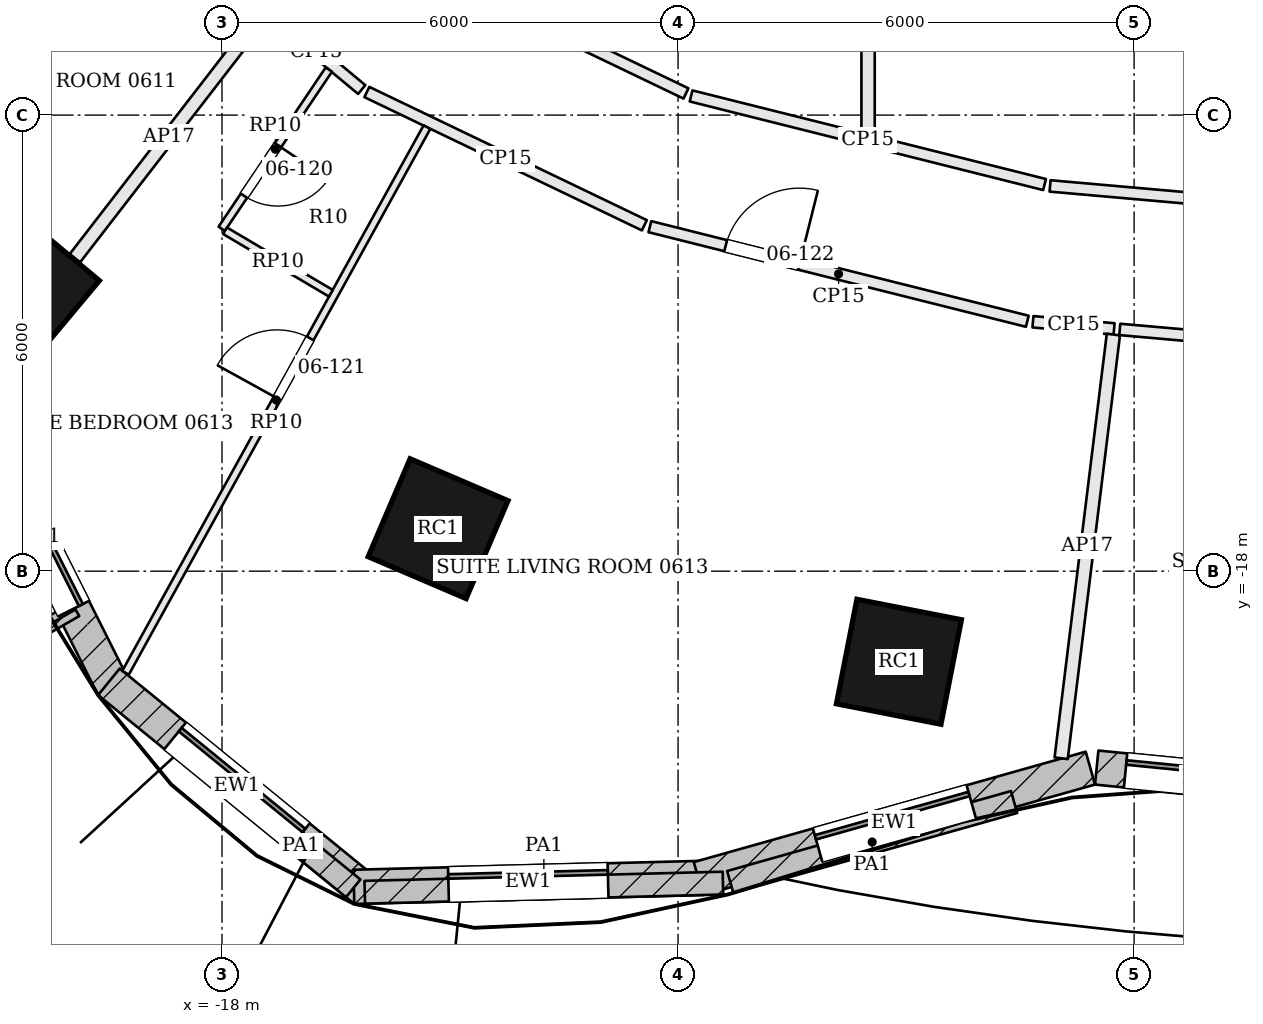
"""IFC4 building model, lengths in metres.
Left out: names, types, materials, properties, quantities, classifications, styles, units other than length and angle.
Written with IfcOpenShell. Run it as: python <this file> out.ifc"""

import sys

from ifc_helpers import new_model, si_unit, direction, frame, frame_2d, origin, origin_2d, place, context, subcontext, project, spatial, rectangle, extrude, element, fill, save


model = new_model("IFC4")
c1 = context("Model", 3, precision=1e-05, world=origin(), true_north=direction((0.0, 1.0)))
c2 = subcontext(c1, "Body", "Model", "MODEL_VIEW")
j1 = project(units=[si_unit("LENGTHUNIT", "METRE"), si_unit("PLANEANGLEUNIT", "RADIAN")], contexts=[c1])
p1 = place(None, origin())
s1 = spatial("IfcSite", under=j1, at=p1, CompositionType="ELEMENT")
p2 = place(p1, origin())
s2 = spatial("IfcBuilding", under=s1, at=p2, CompositionType="ELEMENT")
p3 = place(p2, frame((0.0, 0.0, 37.5)))
s3 = spatial("IfcBuildingStorey", under=s2, at=p3, CompositionType="ELEMENT", Elevation=37.5)
for number, where, z_axis, x_axis in (
    (1, (-20.6, -14.266, 0.0), (0.0, 0.0, 1.0), (0.767, -0.641, 0.0)),
    (2, (-15.157, -17.441, 0.0), (0.0, 0.0, 1.0), (0.919, -0.394, 0.0)),
    (3, (-9.094, -19.192, 0.0), (0.0, 0.0, 1.0), (0.981, -0.192, 0.0)),
):
    element("IfcColumn", number, at=place(p3, frame(where, z_axis=z_axis, x_axis=x_axis)), inside=s3, PredefinedType="COLUMN", context=c2, shape_type="SweptSolid", body=[
        extrude(rectangle(XDim=1.4, YDim=1.4, at=origin_2d()), origin(), (0.0, 0.0, 1.0), 3.6),
    ])
p4 = place(p3, frame((-21.413, -15.586, 0.0), z_axis=(0.0, 0.0, 1.0), x_axis=(0.449428064685, -0.893316525467, 0.0)))
e4 = element("IfcWall", 4, at=p4, inside=s3, PredefinedType="SOLIDWALL", context=c2, shape_type="SweptSolid", body=[
    extrude(rectangle(XDim=4.407, YDim=0.45, at=frame_2d((2.204, 0.0))), origin(), (0.0, 0.0, 1.0), 3.4),
])
p5 = place(p4, frame((1.154, 0.0, 0.9)))
e5 = element("IfcOpeningElement", 5, at=p5, cuts=e4, PredefinedType="OPENING", context=c2, shape_type="SweptSolid", body=[
    extrude(rectangle(XDim=2.1, YDim=2.0, at=frame_2d((1.05, 1.0))), frame((0.0, 0.235, 0.0), z_axis=(0.0, -1.0, 0.0), x_axis=(1.0, 0.0, 0.0)), (0.0, 0.0, 1.0), 0.47),
])
p6 = place(p3, frame((-19.488, -19.456, 0.0), z_axis=(0.0, 0.0, 1.0), x_axis=(0.775096506427, -0.631842864741, 0.0)))
e6 = element("IfcWall", 6, at=p6, inside=s3, PredefinedType="SOLIDWALL", context=c2, shape_type="SweptSolid", body=[
    extrude(rectangle(XDim=4.349, YDim=0.45, at=frame_2d((2.175, 0.0))), origin(), (0.0, 0.0, 1.0), 3.4),
])
p7 = place(p6, frame((1.125, 0.0, 0.9)))
e7 = element("IfcOpeningElement", 7, at=p7, cuts=e6, PredefinedType="OPENING", context=c2, shape_type="SweptSolid", body=[
    extrude(rectangle(XDim=2.1, YDim=2.0, at=frame_2d((1.05, 1.0))), frame((0.0, 0.235, 0.0), z_axis=(0.0, -1.0, 0.0), x_axis=(1.0, 0.0, 0.0)), (0.0, 0.0, 1.0), 0.47),
])
p8 = place(p3, frame((-16.265, -22.153, 0.0), z_axis=(0.0, 0.0, 1.0), x_axis=(0.999672618135, 0.025586257081, 0.0)))
e8 = element("IfcWall", 8, at=p8, inside=s3, PredefinedType="SOLIDWALL", context=c2, shape_type="SweptSolid", body=[
    extrude(rectangle(XDim=4.59, YDim=0.45, at=frame_2d((2.295, 0.0))), origin(), (0.0, 0.0, 1.0), 3.4),
])
p9 = place(p8, frame((1.245, 0.0, 0.9)))
e9 = element("IfcOpeningElement", 9, at=p9, cuts=e8, PredefinedType="OPENING", context=c2, shape_type="SweptSolid", body=[
    extrude(rectangle(XDim=2.1, YDim=2.0, at=frame_2d((1.05, 1.0))), frame((0.0, 0.235, 0.0), z_axis=(0.0, -1.0, 0.0), x_axis=(1.0, 0.0, 0.0)), (0.0, 0.0, 1.0), 0.47),
])
p10 = place(p3, frame((-11.732, -22.044, 0.0), z_axis=(0.0, 0.0, 1.0), x_axis=(0.962535416232, 0.271155992925, 0.0)))
e10 = element("IfcWall", 10, at=p10, inside=s3, PredefinedType="SOLIDWALL", context=c2, shape_type="SweptSolid", body=[
    extrude(rectangle(XDim=5.357, YDim=0.45, at=frame_2d((2.679, 0.0))), origin(), (0.0, 0.0, 1.0), 3.4),
])
p11 = place(p10, frame((1.629, 0.0, 0.9)))
e11 = element("IfcOpeningElement", 11, at=p11, cuts=e10, PredefinedType="OPENING", context=c2, shape_type="SweptSolid", body=[
    extrude(rectangle(XDim=2.1, YDim=2.0, at=frame_2d((1.05, 1.0))), frame((0.0, 0.235, 0.0), z_axis=(0.0, -1.0, 0.0), x_axis=(1.0, 0.0, 0.0)), (0.0, 0.0, 1.0), 0.47),
])
p12 = place(p3, frame((-6.492, -20.584, 0.0), z_axis=(0.0, 0.0, 1.0), x_axis=(0.995123748575, -0.098634299418, 0.0)))
e12 = element("IfcWall", 12, at=p12, inside=s3, PredefinedType="SOLIDWALL", context=c2, shape_type="SweptSolid", body=[
    extrude(rectangle(XDim=2.864, YDim=0.45, at=frame_2d((1.432, 0.0))), origin(), (0.0, 0.0, 1.0), 3.4),
])
p13 = place(p12, frame((0.382, 0.0, 0.9)))
e13 = element("IfcOpeningElement", 13, at=p13, cuts=e12, PredefinedType="OPENING", context=c2, shape_type="SweptSolid", body=[
    extrude(rectangle(XDim=2.1, YDim=2.0, at=frame_2d((1.05, 1.0))), frame((0.0, 0.235, 0.0), z_axis=(0.0, -1.0, 0.0), x_axis=(1.0, 0.0, 0.0)), (0.0, 0.0, 1.0), 0.47),
])
p14 = place(p3, frame((-19.928, -18.504, 0.0), z_axis=(0.0, 0.0, 1.0), x_axis=(-0.865881186914, -0.500249707794, 0.0)))
e14 = element("IfcWall", 14, at=p14, inside=s3, PredefinedType="SOLIDWALL", context=c2, shape_type="SweptSolid", body=[
    extrude(rectangle(XDim=1.75, YDim=0.2, at=frame_2d((0.875, 0.0))), origin(), (0.0, 0.0, 1.0), 3.4),
])
p15 = place(p3, frame((-17.647, -21.053, 3.6), z_axis=(0.0, 0.0, 1.0), x_axis=(0.775067490636, -0.631878457426, 0.0)))
e15 = element("IfcWall", 15, at=p15, inside=s3, PredefinedType="PARAPET", context=c2, shape_type="SweptSolid", body=[
    extrude(rectangle(XDim=1.771, YDim=0.3, at=frame_2d((0.886, 0.0))), origin(), (0.0, 0.0, 1.0), 1.1),
])
p16 = place(p3, frame((-16.122, -22.224, 3.6), z_axis=(0.0, 0.0, 1.0), x_axis=(0.999672688687, 0.025583500399, 0.0)))
e16 = element("IfcWall", 16, at=p16, inside=s3, PredefinedType="PARAPET", context=c2, shape_type="SweptSolid", body=[
    extrude(rectangle(XDim=4.714, YDim=0.3, at=frame_2d((2.357, 0.0))), origin(), (0.0, 0.0, 1.0), 1.1),
])
p17 = place(p3, frame((-11.314, -22.089, 3.6), z_axis=(0.0, 0.0, 1.0), x_axis=(0.962524249835, 0.271195627691, 0.0)))
e17 = element("IfcWall", 17, at=p17, inside=s3, PredefinedType="PARAPET", context=c2, shape_type="SweptSolid", body=[
    extrude(rectangle(XDim=3.88, YDim=0.3, at=frame_2d((1.94, 0.0))), origin(), (0.0, 0.0, 1.0), 1.1),
])
p18 = place(p3, frame((-19.936, -13.883, 0.0), z_axis=(0.0, 0.0, 1.0), x_axis=(0.611385692276, 0.791332758882, 0.0)))
e18 = element("IfcWall", 18, at=p18, inside=s3, PredefinedType="PARTITIONING", context=c2, shape_type="SweptSolid", body=[
    extrude(rectangle(XDim=4.047, YDim=0.175, at=frame_2d((2.023, 0.0))), origin(), (0.0, 0.0, 1.0), 2.68),
])
p19 = place(p3, frame((-17.358, -10.669, 0.0), z_axis=(0.0, 0.0, 1.0), x_axis=(0.768876960633, -0.639396762119, 0.0)))
e19 = element("IfcWall", 19, at=p19, inside=s3, PredefinedType="PARTITIONING", context=c2, shape_type="SweptSolid", body=[
    extrude(rectangle(XDim=1.556, YDim=0.15, at=frame_2d((0.778, 0.0))), origin(), (0.0, 0.0, 1.0), 2.68),
])
p20 = place(p3, frame((-16.094, -11.696, 0.0), z_axis=(0.0, 0.0, 1.0), x_axis=(0.901427088992, -0.432930945108, 0.0)))
e20 = element("IfcWall", 20, at=p20, inside=s3, PredefinedType="PARTITIONING", context=c2, shape_type="SweptSolid", body=[
    extrude(rectangle(XDim=4.05, YDim=0.15, at=frame_2d((2.025, 0.0))), origin(), (0.0, 0.0, 1.0), 2.68),
])
p21 = place(p3, frame((-12.371, -13.468, 0.0), z_axis=(0.0, 0.0, 1.0), x_axis=(0.969987994087, -0.243152814764, 0.0)))
e21 = element("IfcWall", 21, at=p21, inside=s3, PredefinedType="PARTITIONING", context=c2, shape_type="SweptSolid", body=[
    extrude(rectangle(XDim=5.119, YDim=0.15, at=frame_2d((2.559, 0.0))), origin(), (0.0, 0.0, 1.0), 2.68),
])
p22 = place(p21, frame((1.028, 0.0, 0.0)))
e22 = element("IfcOpeningElement", 22, at=p22, cuts=e21, PredefinedType="OPENING", context=c2, shape_type="SweptSolid", body=[
    extrude(rectangle(XDim=1.0, YDim=2.1, at=frame_2d((0.5, 1.05))), frame((0.0, 0.085, 0.0), z_axis=(0.0, -1.0, 0.0), x_axis=(1.0, 0.0, 0.0)), (0.0, 0.0, 1.0), 0.17),
])
p23 = place(p3, frame((-7.331, -14.719, 0.0), z_axis=(0.0, 0.0, 1.0), x_axis=(0.996145089984, -0.087720919406, 0.0)))
e23 = element("IfcWall", 23, at=p23, inside=s3, PredefinedType="PARTITIONING", context=c2, shape_type="SweptSolid", body=[
    extrude(rectangle(XDim=1.072, YDim=0.15, at=frame_2d((0.536, 0.0))), origin(), (0.0, 0.0, 1.0), 2.68),
])
p24 = place(p3, frame((-6.96, -20.462, 0.0), z_axis=(0.0, 0.0, 1.0), x_axis=(0.122317252329, 0.992491052747, 0.0)))
e24 = element("IfcWall", 24, at=p24, inside=s3, PredefinedType="PARTITIONING", context=c2, shape_type="SweptSolid", body=[
    extrude(rectangle(XDim=5.617, YDim=0.175, at=frame_2d((2.808, 0.0))), origin(), (0.0, 0.0, 1.0), 2.68),
])
p25 = place(p3, frame((-6.189, -14.82, 0.0), z_axis=(0.0, 0.0, 1.0), x_axis=(0.996138144042, -0.087799760727, 0.0)))
e25 = element("IfcWall", 25, at=p25, inside=s3, PredefinedType="PARTITIONING", context=c2, shape_type="SweptSolid", body=[
    extrude(rectangle(XDim=4.015, YDim=0.15, at=frame_2d((2.008, 0.0))), origin(), (0.0, 0.0, 1.0), 2.68),
])
p26 = place(p3, frame((-2.208, -13.364, 0.0), z_axis=(0.0, 0.0, 1.0), x_axis=(-0.996134962793, 0.087835846335, 0.0)))
e26 = element("IfcWall", 26, at=p26, inside=s3, PredefinedType="PARTITIONING", context=c2, shape_type="SweptSolid", body=[
    extrude(rectangle(XDim=4.917, YDim=0.15, at=frame_2d((2.458, 0.0))), origin(), (0.0, 0.0, 1.0), 2.68),
])
p27 = place(p3, frame((-7.178, -12.914, 0.0), z_axis=(0.0, 0.0, 1.0), x_axis=(-0.969983523639, 0.243170647628, 0.0)))
e27 = element("IfcWall", 27, at=p27, inside=s3, PredefinedType="PARTITIONING", context=c2, shape_type="SweptSolid", body=[
    extrude(rectangle(XDim=4.794, YDim=0.15, at=frame_2d((2.397, 0.0))), origin(), (0.0, 0.0, 1.0), 2.68),
])
p28 = place(p3, frame((-11.896, -11.715, 0.0), z_axis=(0.0, 0.0, 1.0), x_axis=(-0.901466605799, 0.432848655571, 0.0)))
e28 = element("IfcWall", 28, at=p28, inside=s3, PredefinedType="PARTITIONING", context=c2, shape_type="SweptSolid", body=[
    extrude(rectangle(XDim=3.645, YDim=0.15, at=frame_2d((1.822, 0.0))), origin(), (0.0, 0.0, 1.0), 2.68),
])
p29 = place(p3, frame((-24.157, -12.06, 0.0), z_axis=(0.0, 0.0, 1.0), x_axis=(0.784012147034, 0.620745481903, 0.0)))
e29 = element("IfcWall", 29, at=p29, inside=s3, PredefinedType="PARTITIONING", context=c2, shape_type="SweptSolid", body=[
    extrude(rectangle(XDim=5.733, YDim=0.1, at=frame_2d((2.867, 0.0))), origin(), (0.0, 0.0, 1.0), 2.884),
])
p30 = place(p29, frame((1.658, 0.0, 0.0)))
e30 = element("IfcOpeningElement", 30, at=p30, cuts=e29, PredefinedType="OPENING", context=c2, shape_type="SweptSolid", body=[
    extrude(rectangle(XDim=0.9, YDim=2.4, at=frame_2d((0.45, 1.2))), frame((0.0, 0.06, 0.0), z_axis=(0.0, -1.0, 0.0), x_axis=(1.0, 0.0, 0.0)), (0.0, 0.0, 1.0), 0.12),
])
p31 = place(p3, frame((-19.269, -19.337, 0.0), z_axis=(0.0, 0.0, 1.0), x_axis=(0.483525866251, 0.875330072982, 0.0)))
e31 = element("IfcWall", 31, at=p31, inside=s3, PredefinedType="PARTITIONING", context=c2, shape_type="SweptSolid", body=[
    extrude(rectangle(XDim=8.201, YDim=0.1, at=frame_2d((4.101, 0.0))), origin(), (0.0, 0.0, 1.0), 2.884),
])
p32 = place(p31, frame((4.126, 0.0, 0.0)))
e32 = element("IfcOpeningElement", 32, at=p32, cuts=e31, PredefinedType="OPENING", context=c2, shape_type="SweptSolid", body=[
    extrude(rectangle(XDim=0.9, YDim=2.4, at=frame_2d((0.45, 1.2))), frame((0.0, 0.06, 0.0), z_axis=(0.0, -1.0, 0.0), x_axis=(1.0, 0.0, 0.0)), (0.0, 0.0, 1.0), 0.12),
])
p33 = place(p3, frame((-16.594, -11.401, 0.0), z_axis=(0.0, 0.0, 1.0), x_axis=(-0.558265035611, -0.829662672424, 0.0)))
e33 = element("IfcWall", 33, at=p33, inside=s3, PredefinedType="PARTITIONING", context=c2, shape_type="SweptSolid", body=[
    extrude(rectangle(XDim=2.525, YDim=0.1, at=frame_2d((1.263, 0.0))), origin(), (0.0, 0.0, 1.0), 2.884),
])
p34 = place(p33, frame((1.2, 0.0, 0.0)))
e34 = element("IfcOpeningElement", 34, at=p34, cuts=e33, PredefinedType="OPENING", context=c2, shape_type="SweptSolid", body=[
    extrude(rectangle(XDim=0.8, YDim=2.1, at=frame_2d((0.4, 1.05))), frame((0.0, 0.06, 0.0), z_axis=(0.0, -1.0, 0.0), x_axis=(1.0, 0.0, 0.0)), (0.0, 0.0, 1.0), 0.12),
])
p35 = place(p3, frame((-17.961, -13.521, 0.0), z_axis=(0.0, 0.0, 1.0), x_axis=(0.861133802033, -0.508378377782, 0.0)))
e35 = element("IfcWall", 35, at=p35, inside=s3, PredefinedType="PARTITIONING", context=c2, shape_type="SweptSolid", body=[
    extrude(rectangle(XDim=1.617, YDim=0.1, at=frame_2d((0.809, 0.0))), origin(), (0.0, 0.0, 1.0), 2.884),
])
p36 = place(p3, frame((-9.5, -12.257, 0.0), z_axis=(0.0, 0.0, 1.0), x_axis=(0.0, 1.0, 0.0)))
e36 = element("IfcWall", 36, at=p36, inside=s3, PredefinedType="PARTITIONING", context=c2, shape_type="SweptSolid", body=[
    extrude(rectangle(XDim=7.382, YDim=0.175, at=frame_2d((3.691, 0.0))), origin(), (0.0, 0.0, 1.0), 2.68),
])
p37 = place(p5, origin())
e37 = element("IfcWindow", 37, at=p37, inside=s3, PartitioningType="SINGLE_PANEL", PredefinedType="WINDOW", context=c2, shape_type="SweptSolid", body=[
    extrude(rectangle(XDim=2.1, YDim=2.0, at=frame_2d((1.05, 1.0))), frame((0.0, 0.135, 0.0), z_axis=(0.0, -1.0, 0.0), x_axis=(1.0, 0.0, 0.0)), (0.0, 0.0, 1.0), 0.06),
])
fill(e5, e37)
p38 = place(p7, origin())
e38 = element("IfcWindow", 38, at=p38, inside=s3, PartitioningType="SINGLE_PANEL", PredefinedType="WINDOW", context=c2, shape_type="SweptSolid", body=[
    extrude(rectangle(XDim=2.1, YDim=2.0, at=frame_2d((1.05, 1.0))), frame((0.0, 0.135, 0.0), z_axis=(0.0, -1.0, 0.0), x_axis=(1.0, 0.0, 0.0)), (0.0, 0.0, 1.0), 0.06),
])
fill(e7, e38)
p39 = place(p9, origin())
e39 = element("IfcWindow", 39, at=p39, inside=s3, PartitioningType="SINGLE_PANEL", PredefinedType="WINDOW", context=c2, shape_type="SweptSolid", body=[
    extrude(rectangle(XDim=2.1, YDim=2.0, at=frame_2d((1.05, 1.0))), frame((0.0, 0.135, 0.0), z_axis=(0.0, -1.0, 0.0), x_axis=(1.0, 0.0, 0.0)), (0.0, 0.0, 1.0), 0.06),
])
fill(e9, e39)
p40 = place(p11, origin())
e40 = element("IfcWindow", 40, at=p40, inside=s3, PartitioningType="SINGLE_PANEL", PredefinedType="WINDOW", context=c2, shape_type="SweptSolid", body=[
    extrude(rectangle(XDim=2.1, YDim=2.0, at=frame_2d((1.05, 1.0))), frame((0.0, 0.135, 0.0), z_axis=(0.0, -1.0, 0.0), x_axis=(1.0, 0.0, 0.0)), (0.0, 0.0, 1.0), 0.06),
])
fill(e11, e40)
p41 = place(p13, origin())
e41 = element("IfcWindow", 41, at=p41, inside=s3, PartitioningType="SINGLE_PANEL", PredefinedType="WINDOW", context=c2, shape_type="SweptSolid", body=[
    extrude(rectangle(XDim=2.1, YDim=2.0, at=frame_2d((1.05, 1.0))), frame((0.0, 0.135, 0.0), z_axis=(0.0, -1.0, 0.0), x_axis=(1.0, 0.0, 0.0)), (0.0, 0.0, 1.0), 0.06),
])
fill(e13, e41)
p42 = place(p34, origin())
e42 = element("IfcDoor", 42, at=p42, inside=s3, OperationType="SINGLE_SWING_LEFT", PredefinedType="DOOR", context=c2, shape_type="SweptSolid", body=[
    extrude(rectangle(XDim=0.8, YDim=2.1, at=frame_2d((0.4, 1.05))), frame((0.0, 0.025, 0.0), z_axis=(0.0, -1.0, 0.0), x_axis=(1.0, 0.0, 0.0)), (0.0, 0.0, 1.0), 0.05),
])
fill(e34, e42)
p43 = place(p32, origin())
e43 = element("IfcDoor", 43, at=p43, inside=s3, OperationType="SINGLE_SWING_LEFT", PredefinedType="DOOR", context=c2, shape_type="SweptSolid", body=[
    extrude(rectangle(XDim=0.9, YDim=2.4, at=frame_2d((0.45, 1.2))), frame((0.0, 0.025, 0.0), z_axis=(0.0, -1.0, 0.0), x_axis=(1.0, 0.0, 0.0)), (0.0, 0.0, 1.0), 0.05),
])
fill(e32, e43)
p44 = place(p22, origin())
e44 = element("IfcDoor", 44, at=p44, inside=s3, OperationType="SINGLE_SWING_RIGHT", PredefinedType="DOOR", context=c2, shape_type="SweptSolid", body=[
    extrude(rectangle(XDim=1.0, YDim=2.1, at=frame_2d((0.5, 1.05))), frame((0.0, 0.025, 0.0), z_axis=(0.0, -1.0, 0.0), x_axis=(1.0, 0.0, 0.0)), (0.0, 0.0, 1.0), 0.05),
])
fill(e22, e44)
save(model, sys.argv[1])
